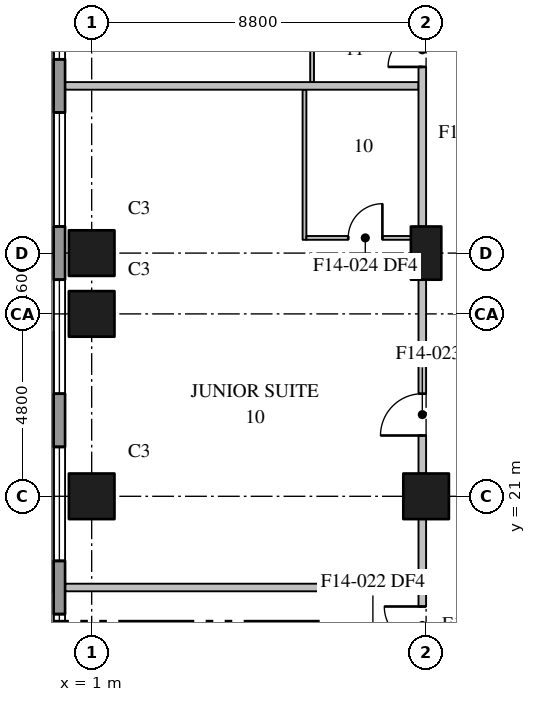
"""IFC4 building model, lengths in metres.
Left out: names, types, materials, properties, quantities, classifications, styles, units other than length and angle.
Written with IfcOpenShell. Run it as: python <this file> out.ifc"""

import sys

from ifc_helpers import new_model, si_unit, direction, frame, frame_2d, origin, origin_2d, place, context, subcontext, project, spatial, rectangle, extrude, element, fill, save


model = new_model("IFC4")
c1 = context("Model", 3, precision=1e-05, world=origin(), true_north=direction((0.0, 1.0)))
c2 = subcontext(c1, "Body", "Model", "MODEL_VIEW")
j1 = project(units=[si_unit("LENGTHUNIT", "METRE"), si_unit("PLANEANGLEUNIT", "RADIAN")], contexts=[c1])
p1 = place(None, origin())
s1 = spatial("IfcSite", under=j1, at=p1, CompositionType="ELEMENT")
p2 = place(p1, origin())
s2 = spatial("IfcBuilding", under=s1, at=p2, CompositionType="ELEMENT")
p3 = place(p2, frame((0.0, 0.0, 129.6)))
s3 = spatial("IfcBuildingStorey", under=s2, at=p3, CompositionType="ELEMENT", Elevation=129.6)
for number, where, z_axis, x_axis in (
    (1, (1.0, 21.0, 0.0), (0.0, 0.0, 1.0), (1.0, 0.0, 0.0)),
    (2, (1.0, 25.8, 0.0), (0.0, 0.0, 1.0), (1.0, 0.0, 0.0)),
    (3, (1.0, 27.4, 0.0), (0.0, 0.0, 1.0), (1.0, 0.0, 0.0)),
    (4, (9.8, 21.0, 0.0), (0.0, 0.0, 1.0), (1.0, 0.0, 0.0)),
):
    element("IfcColumn", number, at=place(p3, frame(where, z_axis=z_axis, x_axis=x_axis)), inside=s3, PredefinedType="COLUMN", context=c2, shape_type="SweptSolid", body=[
        extrude(rectangle(XDim=1.2, YDim=1.2, at=origin_2d()), origin(), (0.0, 0.0, 1.0), 3.7),
    ])
p4 = place(p3, frame((9.8, 27.4, 0.0), z_axis=(0.0, 0.0, 1.0), x_axis=(0.0, 1.0, 0.0)))
e5 = element("IfcColumn", 5, at=p4, inside=s3, PredefinedType="COLUMN", context=c2, shape_type="SweptSolid", body=[
    extrude(rectangle(XDim=1.4, YDim=0.8, at=origin_2d()), origin(), (0.0, 0.0, 1.0), 3.7),
])
p5 = place(p3, frame((0.15, 78.7, 0.0), z_axis=(0.0, 0.0, 1.0), x_axis=(0.0, -1.0, 0.0)))
e6 = element("IfcWall", 6, at=p5, inside=s3, PredefinedType="STANDARD", context=c2, shape_type="SweptSolid", body=[
    extrude(rectangle(XDim=76.5, YDim=0.3, at=frame_2d((38.25, 0.0))), origin(), (0.0, 0.0, 1.0), 3.25),
])
p6 = place(p5, frame((3.6, 0.0, 0.75)))
e7 = element("IfcOpeningElement", 7, at=p6, cuts=e6, PredefinedType="OPENING", context=c2, shape_type="SweptSolid", body=[
    extrude(rectangle(XDim=3.0, YDim=2.3, at=frame_2d((1.5, 1.15))), frame((0.0, 0.16, 0.0), z_axis=(0.0, -1.0, 0.0), x_axis=(1.0, 0.0, 0.0)), (0.0, 0.0, 1.0), 0.32),
])
p7 = place(p5, frame((8.0, 0.0, 0.75)))
e8 = element("IfcOpeningElement", 8, at=p7, cuts=e6, PredefinedType="OPENING", context=c2, shape_type="SweptSolid", body=[
    extrude(rectangle(XDim=3.0, YDim=2.3, at=frame_2d((1.5, 1.15))), frame((0.0, 0.16, 0.0), z_axis=(0.0, -1.0, 0.0), x_axis=(1.0, 0.0, 0.0)), (0.0, 0.0, 1.0), 0.32),
])
p8 = place(p5, frame((12.4, 0.0, 0.75)))
e9 = element("IfcOpeningElement", 9, at=p8, cuts=e6, PredefinedType="OPENING", context=c2, shape_type="SweptSolid", body=[
    extrude(rectangle(XDim=3.0, YDim=2.3, at=frame_2d((1.5, 1.15))), frame((0.0, 0.16, 0.0), z_axis=(0.0, -1.0, 0.0), x_axis=(1.0, 0.0, 0.0)), (0.0, 0.0, 1.0), 0.32),
])
p9 = place(p5, frame((16.8, 0.0, 0.75)))
e10 = element("IfcOpeningElement", 10, at=p9, cuts=e6, PredefinedType="OPENING", context=c2, shape_type="SweptSolid", body=[
    extrude(rectangle(XDim=3.0, YDim=2.3, at=frame_2d((1.5, 1.15))), frame((0.0, 0.16, 0.0), z_axis=(0.0, -1.0, 0.0), x_axis=(1.0, 0.0, 0.0)), (0.0, 0.0, 1.0), 0.32),
])
p10 = place(p5, frame((21.2, 0.0, 0.75)))
e11 = element("IfcOpeningElement", 11, at=p10, cuts=e6, PredefinedType="OPENING", context=c2, shape_type="SweptSolid", body=[
    extrude(rectangle(XDim=3.0, YDim=2.3, at=frame_2d((1.5, 1.15))), frame((0.0, 0.16, 0.0), z_axis=(0.0, -1.0, 0.0), x_axis=(1.0, 0.0, 0.0)), (0.0, 0.0, 1.0), 0.32),
])
p11 = place(p5, frame((25.6, 0.0, 0.75)))
e12 = element("IfcOpeningElement", 12, at=p11, cuts=e6, PredefinedType="OPENING", context=c2, shape_type="SweptSolid", body=[
    extrude(rectangle(XDim=3.0, YDim=2.3, at=frame_2d((1.5, 1.15))), frame((0.0, 0.16, 0.0), z_axis=(0.0, -1.0, 0.0), x_axis=(1.0, 0.0, 0.0)), (0.0, 0.0, 1.0), 0.32),
])
p12 = place(p5, frame((30.0, 0.0, 0.75)))
e13 = element("IfcOpeningElement", 13, at=p12, cuts=e6, PredefinedType="OPENING", context=c2, shape_type="SweptSolid", body=[
    extrude(rectangle(XDim=3.0, YDim=2.3, at=frame_2d((1.5, 1.15))), frame((0.0, 0.16, 0.0), z_axis=(0.0, -1.0, 0.0), x_axis=(1.0, 0.0, 0.0)), (0.0, 0.0, 1.0), 0.32),
])
p13 = place(p5, frame((34.4, 0.0, 0.75)))
e14 = element("IfcOpeningElement", 14, at=p13, cuts=e6, PredefinedType="OPENING", context=c2, shape_type="SweptSolid", body=[
    extrude(rectangle(XDim=3.0, YDim=2.3, at=frame_2d((1.5, 1.15))), frame((0.0, 0.16, 0.0), z_axis=(0.0, -1.0, 0.0), x_axis=(1.0, 0.0, 0.0)), (0.0, 0.0, 1.0), 0.32),
])
p14 = place(p5, frame((38.8, 0.0, 0.75)))
e15 = element("IfcOpeningElement", 15, at=p14, cuts=e6, PredefinedType="OPENING", context=c2, shape_type="SweptSolid", body=[
    extrude(rectangle(XDim=3.0, YDim=2.3, at=frame_2d((1.5, 1.15))), frame((0.0, 0.16, 0.0), z_axis=(0.0, -1.0, 0.0), x_axis=(1.0, 0.0, 0.0)), (0.0, 0.0, 1.0), 0.32),
])
p15 = place(p5, frame((43.2, 0.0, 0.75)))
e16 = element("IfcOpeningElement", 16, at=p15, cuts=e6, PredefinedType="OPENING", context=c2, shape_type="SweptSolid", body=[
    extrude(rectangle(XDim=3.0, YDim=2.3, at=frame_2d((1.5, 1.15))), frame((0.0, 0.16, 0.0), z_axis=(0.0, -1.0, 0.0), x_axis=(1.0, 0.0, 0.0)), (0.0, 0.0, 1.0), 0.32),
])
p16 = place(p5, frame((47.6, 0.0, 0.75)))
e17 = element("IfcOpeningElement", 17, at=p16, cuts=e6, PredefinedType="OPENING", context=c2, shape_type="SweptSolid", body=[
    extrude(rectangle(XDim=3.0, YDim=2.3, at=frame_2d((1.5, 1.15))), frame((0.0, 0.16, 0.0), z_axis=(0.0, -1.0, 0.0), x_axis=(1.0, 0.0, 0.0)), (0.0, 0.0, 1.0), 0.32),
])
p17 = place(p5, frame((52.0, 0.0, 0.75)))
e18 = element("IfcOpeningElement", 18, at=p17, cuts=e6, PredefinedType="OPENING", context=c2, shape_type="SweptSolid", body=[
    extrude(rectangle(XDim=3.0, YDim=2.3, at=frame_2d((1.5, 1.15))), frame((0.0, 0.16, 0.0), z_axis=(0.0, -1.0, 0.0), x_axis=(1.0, 0.0, 0.0)), (0.0, 0.0, 1.0), 0.32),
])
p18 = place(p5, frame((56.4, 0.0, 0.75)))
e19 = element("IfcOpeningElement", 19, at=p18, cuts=e6, PredefinedType="OPENING", context=c2, shape_type="SweptSolid", body=[
    extrude(rectangle(XDim=3.0, YDim=2.3, at=frame_2d((1.5, 1.15))), frame((0.0, 0.16, 0.0), z_axis=(0.0, -1.0, 0.0), x_axis=(1.0, 0.0, 0.0)), (0.0, 0.0, 1.0), 0.32),
])
p19 = place(p5, frame((60.8, 0.0, 0.75)))
e20 = element("IfcOpeningElement", 20, at=p19, cuts=e6, PredefinedType="OPENING", context=c2, shape_type="SweptSolid", body=[
    extrude(rectangle(XDim=3.0, YDim=2.3, at=frame_2d((1.5, 1.15))), frame((0.0, 0.16, 0.0), z_axis=(0.0, -1.0, 0.0), x_axis=(1.0, 0.0, 0.0)), (0.0, 0.0, 1.0), 0.32),
])
p20 = place(p5, frame((65.2, 0.0, 0.75)))
e21 = element("IfcOpeningElement", 21, at=p20, cuts=e6, PredefinedType="OPENING", context=c2, shape_type="SweptSolid", body=[
    extrude(rectangle(XDim=3.0, YDim=2.3, at=frame_2d((1.5, 1.15))), frame((0.0, 0.16, 0.0), z_axis=(0.0, -1.0, 0.0), x_axis=(1.0, 0.0, 0.0)), (0.0, 0.0, 1.0), 0.32),
])
p21 = place(p5, frame((69.6, 0.0, 0.75)))
e22 = element("IfcOpeningElement", 22, at=p21, cuts=e6, PredefinedType="OPENING", context=c2, shape_type="SweptSolid", body=[
    extrude(rectangle(XDim=3.0, YDim=2.3, at=frame_2d((1.5, 1.15))), frame((0.0, 0.16, 0.0), z_axis=(0.0, -1.0, 0.0), x_axis=(1.0, 0.0, 0.0)), (0.0, 0.0, 1.0), 0.32),
])
p22 = place(p3, frame((9.7, 12.9, 0.0), z_axis=(0.0, 0.0, 1.0), x_axis=(0.0, 1.0, 0.0)))
e23 = element("IfcWall", 23, at=p22, inside=s3, PredefinedType="PARTITIONING", context=c2, shape_type="SweptSolid", body=[
    extrude(rectangle(XDim=7.5, YDim=0.2, at=frame_2d((3.75, 0.0))), origin(), (0.0, 0.0, 1.0), 3.25),
])
p23 = place(p22, frame((4.2, 0.0, 0.0)))
e24 = element("IfcOpeningElement", 24, at=p23, cuts=e23, PredefinedType="OPENING", context=c2, shape_type="SweptSolid", body=[
    extrude(rectangle(XDim=1.0, YDim=2.1, at=frame_2d((0.5, 1.05))), frame((0.0, 0.11, 0.0), z_axis=(0.0, -1.0, 0.0), x_axis=(1.0, 0.0, 0.0)), (0.0, 0.0, 1.0), 0.22),
])
p24 = place(p3, frame((9.7, 21.6, 0.0), z_axis=(0.0, 0.0, 1.0), x_axis=(0.0, 1.0, 0.0)))
e25 = element("IfcWall", 25, at=p24, inside=s3, PredefinedType="PARTITIONING", context=c2, shape_type="SweptSolid", body=[
    extrude(rectangle(XDim=5.1, YDim=0.2, at=frame_2d((2.55, 0.0))), origin(), (0.0, 0.0, 1.0), 3.25),
])
p25 = place(p24, frame((1.0, 0.0, 0.0)))
e26 = element("IfcOpeningElement", 26, at=p25, cuts=e25, PredefinedType="OPENING", context=c2, shape_type="SweptSolid", body=[
    extrude(rectangle(XDim=1.1, YDim=2.1, at=frame_2d((0.55, 1.05))), frame((0.0, 0.11, 0.0), z_axis=(0.0, -1.0, 0.0), x_axis=(1.0, 0.0, 0.0)), (0.0, 0.0, 1.0), 0.22),
])
p26 = place(p3, frame((9.7, 28.1, 0.0), z_axis=(0.0, 0.0, 1.0), x_axis=(0.0, 1.0, 0.0)))
e27 = element("IfcWall", 27, at=p26, inside=s3, PredefinedType="PARTITIONING", context=c2, shape_type="SweptSolid", body=[
    extrude(rectangle(XDim=7.4, YDim=0.2, at=frame_2d((3.7, 0.0))), origin(), (0.0, 0.0, 1.0), 3.25),
])
p27 = place(p26, frame((6.4, 0.0, 0.0)))
e28 = element("IfcOpeningElement", 28, at=p27, cuts=e27, PredefinedType="OPENING", context=c2, shape_type="SweptSolid", body=[
    extrude(rectangle(XDim=0.9, YDim=2.1, at=frame_2d((0.45, 1.05))), frame((0.0, 0.11, 0.0), z_axis=(0.0, -1.0, 0.0), x_axis=(1.0, 0.0, 0.0)), (0.0, 0.0, 1.0), 0.22),
])
p28 = place(p26, frame((4.2, 0.0, 0.0)))
e29 = element("IfcOpeningElement", 29, at=p28, cuts=e27, PredefinedType="OPENING", context=c2, shape_type="SweptSolid", body=[
    extrude(rectangle(XDim=0.9, YDim=2.1, at=frame_2d((0.45, 1.05))), frame((0.0, 0.11, 0.0), z_axis=(0.0, -1.0, 0.0), x_axis=(1.0, 0.0, 0.0)), (0.0, 0.0, 1.0), 0.22),
])
for number, where, z_axis, x_axis in (
    (30, (0.31, 18.6, 0.0), (0.0, 0.0, 1.0), (1.0, 0.0, 0.0)),
    (31, (0.31, 31.8, 0.0), (0.0, 0.0, 1.0), (1.0, 0.0, 0.0)),
):
    element("IfcWall", number, at=place(p3, frame(where, z_axis=z_axis, x_axis=x_axis)), inside=s3, PredefinedType="PARTITIONING", context=c2, shape_type="SweptSolid", body=[
        extrude(rectangle(XDim=9.29, YDim=0.2, at=frame_2d((4.645, 0.0))), origin(), (0.0, 0.0, 1.0), 3.25),
    ])
p29 = place(p3, frame((6.8, 31.9, 0.0), z_axis=(0.0, 0.0, 1.0), x_axis=(0.0, 1.0, 0.0)))
e32 = element("IfcWall", 32, at=p29, inside=s3, PredefinedType="PARTITIONING", context=c2, shape_type="SweptSolid", body=[
    extrude(rectangle(XDim=1.85, YDim=0.1, at=frame_2d((0.925, 0.0))), origin(), (0.0, 0.0, 1.0), 3.25),
])
p30 = place(p3, frame((6.6, 27.75, 0.0), z_axis=(0.0, 0.0, 1.0), x_axis=(0.0, 1.0, 0.0)))
e33 = element("IfcWall", 33, at=p30, inside=s3, PredefinedType="PARTITIONING", context=c2, shape_type="SweptSolid", body=[
    extrude(rectangle(XDim=3.95, YDim=0.1, at=frame_2d((1.975, 0.0))), origin(), (0.0, 0.0, 1.0), 3.25),
])
p31 = place(p3, frame((6.65, 27.8, 0.0), z_axis=(0.0, 0.0, 1.0), x_axis=(1.0, 0.0, 0.0)))
e34 = element("IfcWall", 34, at=p31, inside=s3, PredefinedType="PARTITIONING", context=c2, shape_type="SweptSolid", body=[
    extrude(rectangle(XDim=2.75, YDim=0.1, at=frame_2d((1.375, 0.0))), origin(), (0.0, 0.0, 1.0), 3.25),
])
p32 = place(p31, frame((1.1, 0.0, 0.0)))
e35 = element("IfcOpeningElement", 35, at=p32, cuts=e34, PredefinedType="OPENING", context=c2, shape_type="SweptSolid", body=[
    extrude(rectangle(XDim=0.9, YDim=2.1, at=frame_2d((0.45, 1.05))), frame((0.0, 0.06, 0.0), z_axis=(0.0, -1.0, 0.0), x_axis=(1.0, 0.0, 0.0)), (0.0, 0.0, 1.0), 0.12),
])
p33 = place(p15, origin())
e36 = element("IfcWindow", 36, at=p33, inside=s3, PartitioningType="SINGLE_PANEL", PredefinedType="WINDOW", context=c2, shape_type="SweptSolid", body=[
    extrude(rectangle(XDim=3.0, YDim=2.3, at=frame_2d((1.5, 1.15))), frame((0.0, 0.03, 0.0), z_axis=(0.0, -1.0, 0.0), x_axis=(1.0, 0.0, 0.0)), (0.0, 0.0, 1.0), 0.06),
])
fill(e16, e36)
p34 = place(p16, origin())
e37 = element("IfcWindow", 37, at=p34, inside=s3, PartitioningType="SINGLE_PANEL", PredefinedType="WINDOW", context=c2, shape_type="SweptSolid", body=[
    extrude(rectangle(XDim=3.0, YDim=2.3, at=frame_2d((1.5, 1.15))), frame((0.0, 0.03, 0.0), z_axis=(0.0, -1.0, 0.0), x_axis=(1.0, 0.0, 0.0)), (0.0, 0.0, 1.0), 0.06),
])
fill(e17, e37)
p35 = place(p17, origin())
e38 = element("IfcWindow", 38, at=p35, inside=s3, PartitioningType="SINGLE_PANEL", PredefinedType="WINDOW", context=c2, shape_type="SweptSolid", body=[
    extrude(rectangle(XDim=3.0, YDim=2.3, at=frame_2d((1.5, 1.15))), frame((0.0, 0.03, 0.0), z_axis=(0.0, -1.0, 0.0), x_axis=(1.0, 0.0, 0.0)), (0.0, 0.0, 1.0), 0.06),
])
fill(e18, e38)
p36 = place(p18, origin())
e39 = element("IfcWindow", 39, at=p36, inside=s3, PartitioningType="SINGLE_PANEL", PredefinedType="WINDOW", context=c2, shape_type="SweptSolid", body=[
    extrude(rectangle(XDim=3.0, YDim=2.3, at=frame_2d((1.5, 1.15))), frame((0.0, 0.03, 0.0), z_axis=(0.0, -1.0, 0.0), x_axis=(1.0, 0.0, 0.0)), (0.0, 0.0, 1.0), 0.06),
])
fill(e19, e39)
p37 = place(p19, origin())
e40 = element("IfcWindow", 40, at=p37, inside=s3, PartitioningType="SINGLE_PANEL", PredefinedType="WINDOW", context=c2, shape_type="SweptSolid", body=[
    extrude(rectangle(XDim=3.0, YDim=2.3, at=frame_2d((1.5, 1.15))), frame((0.0, 0.03, 0.0), z_axis=(0.0, -1.0, 0.0), x_axis=(1.0, 0.0, 0.0)), (0.0, 0.0, 1.0), 0.06),
])
fill(e20, e40)
p38 = place(p23, origin())
e41 = element("IfcDoor", 41, at=p38, inside=s3, OperationType="SINGLE_SWING_RIGHT", PredefinedType="DOOR", context=c2, shape_type="SweptSolid", body=[
    extrude(rectangle(XDim=1.0, YDim=2.1, at=frame_2d((0.5, 1.05))), frame((0.0, 0.025, 0.0), z_axis=(0.0, -1.0, 0.0), x_axis=(1.0, 0.0, 0.0)), (0.0, 0.0, 1.0), 0.05),
])
fill(e24, e41)
p39 = place(p25, origin())
e42 = element("IfcDoor", 42, at=p39, inside=s3, OperationType="SINGLE_SWING_LEFT", PredefinedType="DOOR", context=c2, shape_type="SweptSolid", body=[
    extrude(rectangle(XDim=1.1, YDim=2.1, at=frame_2d((0.55, 1.05))), frame((0.0, 0.025, 0.0), z_axis=(0.0, -1.0, 0.0), x_axis=(1.0, 0.0, 0.0)), (0.0, 0.0, 1.0), 0.05),
])
fill(e26, e42)
p40 = place(p32, origin())
e43 = element("IfcDoor", 43, at=p40, inside=s3, OperationType="SINGLE_SWING_RIGHT", PredefinedType="DOOR", context=c2, shape_type="SweptSolid", body=[
    extrude(rectangle(XDim=0.9, YDim=2.1, at=frame_2d((0.45, 1.05))), frame((0.0, 0.025, 0.0), z_axis=(0.0, -1.0, 0.0), x_axis=(1.0, 0.0, 0.0)), (0.0, 0.0, 1.0), 0.05),
])
fill(e35, e43)
p41 = place(p28, origin())
e44 = element("IfcDoor", 44, at=p41, inside=s3, OperationType="SINGLE_SWING_LEFT", PredefinedType="DOOR", context=c2, shape_type="SweptSolid", body=[
    extrude(rectangle(XDim=0.9, YDim=2.1, at=frame_2d((0.45, 1.05))), frame((0.0, 0.025, 0.0), z_axis=(0.0, -1.0, 0.0), x_axis=(1.0, 0.0, 0.0)), (0.0, 0.0, 1.0), 0.05),
])
fill(e29, e44)
save(model, sys.argv[1])
